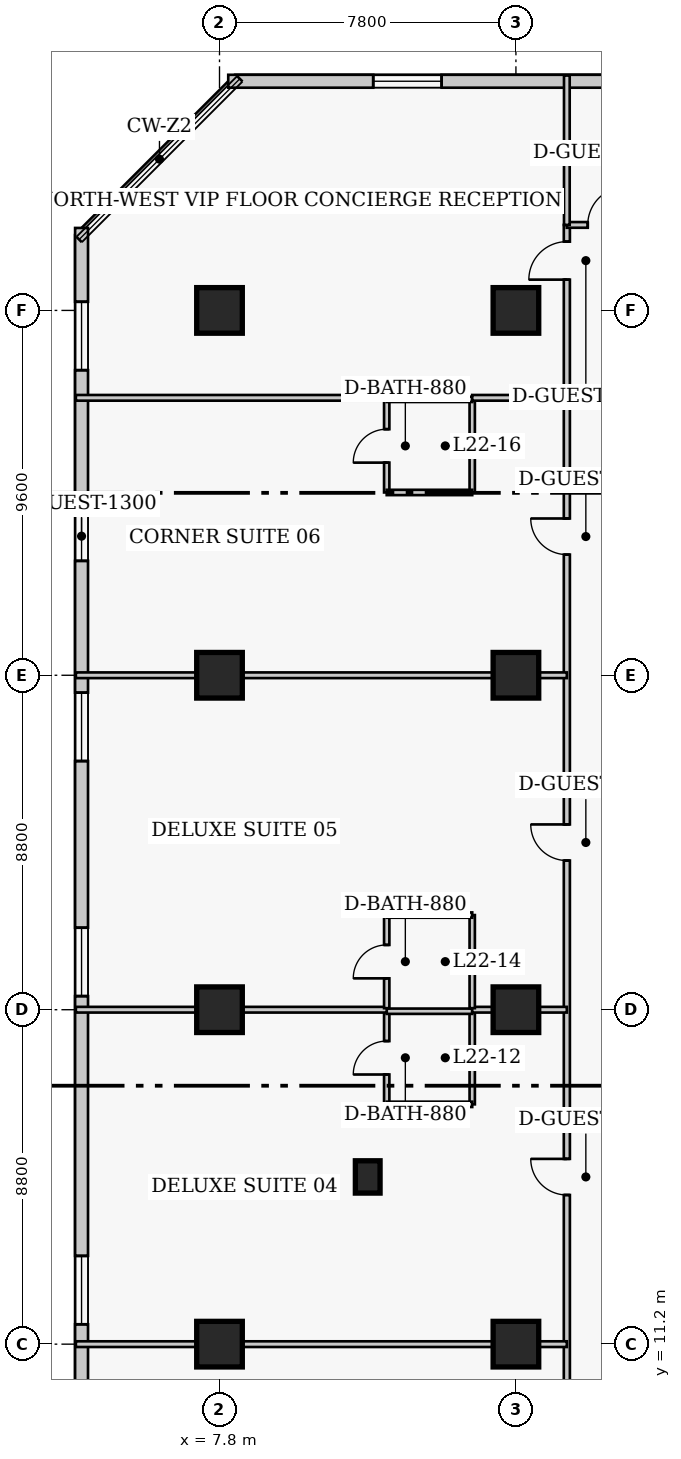
"""IFC4 building model, lengths in metres.
Left out: names, types, materials, properties, quantities, classifications, styles, units other than length and angle.
Written with IfcOpenShell. Run it as: python <this file> out.ifc"""

import sys

from ifc_helpers import new_model, si_unit, direction, frame, frame_2d, origin, origin_2d, place, context, subcontext, project, spatial, rectangle, extrude, element, fill, save


model = new_model("IFC4")
c1 = context("Model", 3, precision=1e-05, world=origin(), true_north=direction((0.0, 1.0)))
c2 = subcontext(c1, "Body", "Model", "MODEL_VIEW")
j1 = project(units=[si_unit("LENGTHUNIT", "METRE"), si_unit("PLANEANGLEUNIT", "RADIAN")], contexts=[c1])
p1 = place(None, origin())
s1 = spatial("IfcSite", under=j1, at=p1, CompositionType="ELEMENT")
p2 = place(p1, origin())
s2 = spatial("IfcBuilding", under=s1, at=p2, CompositionType="ELEMENT")
p3 = place(p2, frame((0.0, 0.0, 91.8)))
s3 = spatial("IfcBuildingStorey", under=s2, at=p3, CompositionType="ELEMENT", Elevation=91.8)
for number, where, z_axis, x_axis in (
    (1, (7.8, 11.2, 0.0), (0.0, 0.0, 1.0), (1.0, 0.0, 0.0)),
    (2, (7.8, 20.0, 0.0), (0.0, 0.0, 1.0), (1.0, 0.0, 0.0)),
    (3, (7.8, 28.8, 0.0), (0.0, 0.0, 1.0), (1.0, 0.0, 0.0)),
    (4, (7.8, 38.4, 0.0), (0.0, 0.0, 1.0), (1.0, 0.0, 0.0)),
    (5, (15.6, 11.2, 0.0), (0.0, 0.0, 1.0), (1.0, 0.0, 0.0)),
    (6, (15.6, 20.0, 0.0), (0.0, 0.0, 1.0), (1.0, 0.0, 0.0)),
    (7, (15.6, 28.8, 0.0), (0.0, 0.0, 1.0), (1.0, 0.0, 0.0)),
    (8, (15.6, 38.4, 0.0), (0.0, 0.0, 1.0), (1.0, 0.0, 0.0)),
):
    element("IfcColumn", number, at=place(p3, frame(where, z_axis=z_axis, x_axis=x_axis)), inside=s3, PredefinedType="COLUMN", context=c2, shape_type="SweptSolid", body=[
        extrude(rectangle(XDim=1.2, YDim=1.2, at=origin_2d()), origin(), (0.0, 0.0, 1.0), 3.8),
    ])
p4 = place(p3, frame((11.7, 15.6, 0.0), z_axis=(0.0, 0.0, 1.0), x_axis=(1.0, 0.0, 0.0)))
e9 = element("IfcColumn", 9, at=p4, inside=s3, PredefinedType="PILASTER", context=c2, shape_type="SweptSolid", body=[
    extrude(rectangle(XDim=0.65, YDim=0.85, at=origin_2d()), origin(), (0.0, 0.0, 1.0), 3.8),
])
p5 = place(p3, frame((36.32, 44.43, 0.0), z_axis=(0.0, 0.0, 1.0), x_axis=(-1.0, 0.0, 0.0)))
e10 = element("IfcWall", 10, at=p5, inside=s3, PredefinedType="SOLIDWALL", context=c2, shape_type="SweptSolid", body=[
    extrude(rectangle(XDim=28.29, YDim=0.34, at=frame_2d((14.145, 0.0))), origin(), (0.0, 0.0, 1.0), 3.54),
])
p6 = place(p5, frame((3.815, 0.0, 0.85)))
e11 = element("IfcOpeningElement", 11, at=p6, cuts=e10, PredefinedType="OPENING", context=c2, shape_type="SweptSolid", body=[
    extrude(rectangle(XDim=1.8, YDim=1.8, at=frame_2d((0.9, 0.9))), frame((0.0, 0.18, 0.0), z_axis=(0.0, -1.0, 0.0), x_axis=(1.0, 0.0, 0.0)), (0.0, 0.0, 1.0), 0.36),
])
p7 = place(p5, frame((13.245, 0.0, 0.85)))
e12 = element("IfcOpeningElement", 12, at=p7, cuts=e10, PredefinedType="OPENING", context=c2, shape_type="SweptSolid", body=[
    extrude(rectangle(XDim=1.8, YDim=1.8, at=frame_2d((0.9, 0.9))), frame((0.0, 0.18, 0.0), z_axis=(0.0, -1.0, 0.0), x_axis=(1.0, 0.0, 0.0)), (0.0, 0.0, 1.0), 0.36),
])
p8 = place(p5, frame((22.675, 0.0, 0.85)))
e13 = element("IfcOpeningElement", 13, at=p8, cuts=e10, PredefinedType="OPENING", context=c2, shape_type="SweptSolid", body=[
    extrude(rectangle(XDim=1.8, YDim=1.8, at=frame_2d((0.9, 0.9))), frame((0.0, 0.18, 0.0), z_axis=(0.0, -1.0, 0.0), x_axis=(1.0, 0.0, 0.0)), (0.0, 0.0, 1.0), 0.36),
])
p9 = place(p3, frame((4.17, 40.57, 0.0), z_axis=(0.0, 0.0, 1.0), x_axis=(0.0, -1.0, 0.0)))
e14 = element("IfcWall", 14, at=p9, inside=s3, PredefinedType="SOLIDWALL", context=c2, shape_type="SweptSolid", body=[
    extrude(rectangle(XDim=31.94, YDim=0.34, at=frame_2d((15.97, 0.0))), origin(), (0.0, 0.0, 1.0), 3.54),
])
p10 = place(p9, frame((1.942, 0.0, 0.85)))
e15 = element("IfcOpeningElement", 15, at=p10, cuts=e14, PredefinedType="OPENING", context=c2, shape_type="SweptSolid", body=[
    extrude(rectangle(XDim=1.8, YDim=1.8, at=frame_2d((0.9, 0.9))), frame((0.0, 0.18, 0.0), z_axis=(0.0, -1.0, 0.0), x_axis=(1.0, 0.0, 0.0)), (0.0, 0.0, 1.0), 0.36),
])
p11 = place(p9, frame((12.228, 0.0, 0.85)))
e16 = element("IfcOpeningElement", 16, at=p11, cuts=e14, PredefinedType="OPENING", context=c2, shape_type="SweptSolid", body=[
    extrude(rectangle(XDim=1.8, YDim=1.8, at=frame_2d((0.9, 0.9))), frame((0.0, 0.18, 0.0), z_axis=(0.0, -1.0, 0.0), x_axis=(1.0, 0.0, 0.0)), (0.0, 0.0, 1.0), 0.36),
])
p12 = place(p9, frame((18.413, 0.0, 0.85)))
e17 = element("IfcOpeningElement", 17, at=p12, cuts=e14, PredefinedType="OPENING", context=c2, shape_type="SweptSolid", body=[
    extrude(rectangle(XDim=1.8, YDim=1.8, at=frame_2d((0.9, 0.9))), frame((0.0, 0.18, 0.0), z_axis=(0.0, -1.0, 0.0), x_axis=(1.0, 0.0, 0.0)), (0.0, 0.0, 1.0), 0.36),
])
p13 = place(p9, frame((27.048, 0.0, 0.85)))
e18 = element("IfcOpeningElement", 18, at=p13, cuts=e14, PredefinedType="OPENING", context=c2, shape_type="SweptSolid", body=[
    extrude(rectangle(XDim=1.8, YDim=1.8, at=frame_2d((0.9, 0.9))), frame((0.0, 0.18, 0.0), z_axis=(0.0, -1.0, 0.0), x_axis=(1.0, 0.0, 0.0)), (0.0, 0.0, 1.0), 0.36),
])
p14 = place(p9, frame((7.46, 0.0, 0.85)))
e19 = element("IfcOpeningElement", 19, at=p14, cuts=e14, PredefinedType="OPENING", context=c2, shape_type="SweptSolid", body=[
    extrude(rectangle(XDim=1.3, YDim=1.7, at=frame_2d((0.65, 0.85))), frame((0.0, 0.18, 0.0), z_axis=(0.0, -1.0, 0.0), x_axis=(1.0, 0.0, 0.0)), (0.0, 0.0, 1.0), 0.36),
])
p15 = place(p3, frame((16.94, 6.65, 0.0), z_axis=(0.0, 0.0, 1.0), x_axis=(0.0, 1.0, 0.0)))
e20 = element("IfcWall", 20, at=p15, inside=s3, PredefinedType="PARTITIONING", context=c2, shape_type="SweptSolid", body=[
    extrude(rectangle(XDim=34.0, YDim=0.16, at=frame_2d((17.0, 0.0))), origin(), (0.0, 0.0, 1.0), 3.54),
])
p16 = place(p15, frame((1.8, 0.0, 0.0)))
e21 = element("IfcOpeningElement", 21, at=p16, cuts=e20, PredefinedType="OPENING", context=c2, shape_type="SweptSolid", body=[
    extrude(rectangle(XDim=0.95, YDim=2.1, at=frame_2d((0.475, 1.05))), frame((0.0, 0.09, 0.0), z_axis=(0.0, -1.0, 0.0), x_axis=(1.0, 0.0, 0.0)), (0.0, 0.0, 1.0), 0.18),
])
p17 = place(p15, frame((8.475, 0.0, 0.0)))
e22 = element("IfcOpeningElement", 22, at=p17, cuts=e20, PredefinedType="OPENING", context=c2, shape_type="SweptSolid", body=[
    extrude(rectangle(XDim=0.95, YDim=2.1, at=frame_2d((0.475, 1.05))), frame((0.0, 0.09, 0.0), z_axis=(0.0, -1.0, 0.0), x_axis=(1.0, 0.0, 0.0)), (0.0, 0.0, 1.0), 0.18),
])
p18 = place(p15, frame((17.275, 0.0, 0.0)))
e23 = element("IfcOpeningElement", 23, at=p18, cuts=e20, PredefinedType="OPENING", context=c2, shape_type="SweptSolid", body=[
    extrude(rectangle(XDim=0.95, YDim=2.1, at=frame_2d((0.475, 1.05))), frame((0.0, 0.09, 0.0), z_axis=(0.0, -1.0, 0.0), x_axis=(1.0, 0.0, 0.0)), (0.0, 0.0, 1.0), 0.18),
])
p19 = place(p15, frame((25.325, 0.0, 0.0)))
e24 = element("IfcOpeningElement", 24, at=p19, cuts=e20, PredefinedType="OPENING", context=c2, shape_type="SweptSolid", body=[
    extrude(rectangle(XDim=0.95, YDim=2.1, at=frame_2d((0.475, 1.05))), frame((0.0, 0.09, 0.0), z_axis=(0.0, -1.0, 0.0), x_axis=(1.0, 0.0, 0.0)), (0.0, 0.0, 1.0), 0.18),
])
p20 = place(p15, frame((32.56, 0.0, 0.0)))
e25 = element("IfcOpeningElement", 25, at=p20, cuts=e20, PredefinedType="OPENING", context=c2, shape_type="SweptSolid", body=[
    extrude(rectangle(XDim=1.0, YDim=2.15, at=frame_2d((0.5, 1.075))), frame((0.0, 0.09, 0.0), z_axis=(0.0, -1.0, 0.0), x_axis=(1.0, 0.0, 0.0)), (0.0, 0.0, 1.0), 0.18),
])
p21 = place(p3, frame((16.94, 40.65, 0.0), z_axis=(0.0, 0.0, 1.0), x_axis=(1.0, 0.0, 0.0)))
e26 = element("IfcWall", 26, at=p21, inside=s3, PredefinedType="PARTITIONING", context=c2, shape_type="SweptSolid", body=[
    extrude(rectangle(XDim=5.16, YDim=0.15, at=frame_2d((2.58, 0.0))), origin(), (0.0, 0.0, 1.0), 3.54),
])
p22 = place(p21, frame((0.55, 0.0, 0.0)))
e27 = element("IfcOpeningElement", 27, at=p22, cuts=e26, PredefinedType="OPENING", context=c2, shape_type="SweptSolid", body=[
    extrude(rectangle(XDim=1.0, YDim=2.15, at=frame_2d((0.5, 1.075))), frame((0.0, 0.085, 0.0), z_axis=(0.0, -1.0, 0.0), x_axis=(1.0, 0.0, 0.0)), (0.0, 0.0, 1.0), 0.17),
])
p23 = place(p3, frame((16.94, 40.65, 0.0), z_axis=(0.0, 0.0, 1.0), x_axis=(0.0, 1.0, 0.0)))
e28 = element("IfcWall", 28, at=p23, inside=s3, PredefinedType="PARTITIONING", context=c2, shape_type="SweptSolid", body=[
    extrude(rectangle(XDim=3.93, YDim=0.15, at=frame_2d((1.965, 0.0))), origin(), (0.0, 0.0, 1.0), 3.54),
])
p24 = place(p3, frame((4.02, 11.2, 0.0), z_axis=(0.0, 0.0, 1.0), x_axis=(1.0, 0.0, 0.0)))
e29 = element("IfcWall", 29, at=p24, inside=s3, PredefinedType="PARTITIONING", context=c2, shape_type="SweptSolid", body=[
    extrude(rectangle(XDim=12.92, YDim=0.15, at=frame_2d((6.46, 0.0))), origin(), (0.0, 0.0, 1.0), 2.679),
])
p25 = place(p3, frame((12.2, 17.51, 0.0), z_axis=(0.0, 0.0, 1.0), x_axis=(0.0, 1.0, 0.0)))
e30 = element("IfcWall", 30, at=p25, inside=s3, PredefinedType="PLUMBINGWALL", context=c2, shape_type="SweptSolid", body=[
    extrude(rectangle(XDim=2.45, YDim=0.14, at=frame_2d((1.225, 0.0))), origin(), (0.0, 0.0, 1.0), 3.54),
])
p26 = place(p25, frame((0.785, 0.0, 0.0)))
e31 = element("IfcOpeningElement", 31, at=p26, cuts=e30, PredefinedType="OPENING", context=c2, shape_type="SweptSolid", body=[
    extrude(rectangle(XDim=0.88, YDim=2.05, at=frame_2d((0.44, 1.025))), frame((0.0, 0.08, 0.0), z_axis=(0.0, -1.0, 0.0), x_axis=(1.0, 0.0, 0.0)), (0.0, 0.0, 1.0), 0.16),
])
p27 = place(p3, frame((14.45, 17.51, 0.0), z_axis=(0.0, 0.0, 1.0), x_axis=(0.0, 1.0, 0.0)))
e32 = element("IfcWall", 32, at=p27, inside=s3, PredefinedType="PLUMBINGWALL", context=c2, shape_type="SweptSolid", body=[
    extrude(rectangle(XDim=2.45, YDim=0.14, at=frame_2d((1.225, 0.0))), origin(), (0.0, 0.0, 1.0), 3.54),
])
p28 = place(p3, frame((12.2, 17.51, 0.0), z_axis=(0.0, 0.0, 1.0), x_axis=(1.0, 0.0, 0.0)))
e33 = element("IfcWall", 33, at=p28, inside=s3, PredefinedType="PLUMBINGWALL", context=c2, shape_type="SweptSolid", body=[
    extrude(rectangle(XDim=2.25, YDim=0.14, at=frame_2d((1.125, 0.0))), origin(), (0.0, 0.0, 1.0), 3.54),
])
p29 = place(p3, frame((12.2, 19.96, 0.0), z_axis=(0.0, 0.0, 1.0), x_axis=(1.0, 0.0, 0.0)))
e34 = element("IfcWall", 34, at=p29, inside=s3, PredefinedType="PLUMBINGWALL", context=c2, shape_type="SweptSolid", body=[
    extrude(rectangle(XDim=2.25, YDim=0.14, at=frame_2d((1.125, 0.0))), origin(), (0.0, 0.0, 1.0), 2.679),
])
p30 = place(p3, frame((4.02, 20.0, 0.0), z_axis=(0.0, 0.0, 1.0), x_axis=(1.0, 0.0, 0.0)))
e35 = element("IfcWall", 35, at=p30, inside=s3, PredefinedType="PARTITIONING", context=c2, shape_type="SweptSolid", body=[
    extrude(rectangle(XDim=8.18, YDim=0.15, at=frame_2d((4.09, 0.0))), origin(), (0.0, 0.0, 1.0), 2.679),
])
p31 = place(p3, frame((14.45, 20.0, 0.0), z_axis=(0.0, 0.0, 1.0), x_axis=(1.0, 0.0, 0.0)))
e36 = element("IfcWall", 36, at=p31, inside=s3, PredefinedType="PARTITIONING", context=c2, shape_type="SweptSolid", body=[
    extrude(rectangle(XDim=2.49, YDim=0.15, at=frame_2d((1.245, 0.0))), origin(), (0.0, 0.0, 1.0), 2.679),
])
p32 = place(p3, frame((12.2, 20.04, 0.0), z_axis=(0.0, 0.0, 1.0), x_axis=(0.0, 1.0, 0.0)))
e37 = element("IfcWall", 37, at=p32, inside=s3, PredefinedType="PLUMBINGWALL", context=c2, shape_type="SweptSolid", body=[
    extrude(rectangle(XDim=2.45, YDim=0.14, at=frame_2d((1.225, 0.0))), origin(), (0.0, 0.0, 1.0), 3.54),
])
p33 = place(p32, frame((0.785, 0.0, 0.0)))
e38 = element("IfcOpeningElement", 38, at=p33, cuts=e37, PredefinedType="OPENING", context=c2, shape_type="SweptSolid", body=[
    extrude(rectangle(XDim=0.88, YDim=2.05, at=frame_2d((0.44, 1.025))), frame((0.0, 0.08, 0.0), z_axis=(0.0, -1.0, 0.0), x_axis=(1.0, 0.0, 0.0)), (0.0, 0.0, 1.0), 0.16),
])
p34 = place(p3, frame((14.45, 20.04, 0.0), z_axis=(0.0, 0.0, 1.0), x_axis=(0.0, 1.0, 0.0)))
e39 = element("IfcWall", 39, at=p34, inside=s3, PredefinedType="PLUMBINGWALL", context=c2, shape_type="SweptSolid", body=[
    extrude(rectangle(XDim=2.45, YDim=0.14, at=frame_2d((1.225, 0.0))), origin(), (0.0, 0.0, 1.0), 3.54),
])
p35 = place(p3, frame((12.2, 22.49, 0.0), z_axis=(0.0, 0.0, 1.0), x_axis=(1.0, 0.0, 0.0)))
e40 = element("IfcWall", 40, at=p35, inside=s3, PredefinedType="PLUMBINGWALL", context=c2, shape_type="SweptSolid", body=[
    extrude(rectangle(XDim=2.25, YDim=0.14, at=frame_2d((1.125, 0.0))), origin(), (0.0, 0.0, 1.0), 3.54),
])
p36 = place(p3, frame((4.02, 28.8, 0.0), z_axis=(0.0, 0.0, 1.0), x_axis=(1.0, 0.0, 0.0)))
e41 = element("IfcWall", 41, at=p36, inside=s3, PredefinedType="PARTITIONING", context=c2, shape_type="SweptSolid", body=[
    extrude(rectangle(XDim=12.92, YDim=0.15, at=frame_2d((6.46, 0.0))), origin(), (0.0, 0.0, 1.0), 2.679),
])
p37 = place(p3, frame((12.2, 33.61, 0.0), z_axis=(0.0, 0.0, 1.0), x_axis=(0.0, 1.0, 0.0)))
e42 = element("IfcWall", 42, at=p37, inside=s3, PredefinedType="PLUMBINGWALL", context=c2, shape_type="SweptSolid", body=[
    extrude(rectangle(XDim=2.45, YDim=0.14, at=frame_2d((1.225, 0.0))), origin(), (0.0, 0.0, 1.0), 3.54),
])
p38 = place(p37, frame((0.785, 0.0, 0.0)))
e43 = element("IfcOpeningElement", 43, at=p38, cuts=e42, PredefinedType="OPENING", context=c2, shape_type="SweptSolid", body=[
    extrude(rectangle(XDim=0.88, YDim=2.05, at=frame_2d((0.44, 1.025))), frame((0.0, 0.08, 0.0), z_axis=(0.0, -1.0, 0.0), x_axis=(1.0, 0.0, 0.0)), (0.0, 0.0, 1.0), 0.16),
])
p39 = place(p3, frame((14.45, 33.61, 0.0), z_axis=(0.0, 0.0, 1.0), x_axis=(0.0, 1.0, 0.0)))
e44 = element("IfcWall", 44, at=p39, inside=s3, PredefinedType="PLUMBINGWALL", context=c2, shape_type="SweptSolid", body=[
    extrude(rectangle(XDim=2.45, YDim=0.14, at=frame_2d((1.225, 0.0))), origin(), (0.0, 0.0, 1.0), 3.54),
])
for number, where, z_axis, x_axis in (
    (45, (12.2, 33.61, 0.0), (0.0, 0.0, 1.0), (1.0, 0.0, 0.0)),
    (46, (12.2, 36.06, 0.0), (0.0, 0.0, 1.0), (1.0, 0.0, 0.0)),
):
    element("IfcWall", number, at=place(p3, frame(where, z_axis=z_axis, x_axis=x_axis)), inside=s3, PredefinedType="PLUMBINGWALL", context=c2, shape_type="SweptSolid", body=[
        extrude(rectangle(XDim=2.25, YDim=0.14, at=frame_2d((1.125, 0.0))), origin(), (0.0, 0.0, 1.0), 3.54),
    ])
p40 = place(p3, frame((4.02, 36.1, 0.0), z_axis=(0.0, 0.0, 1.0), x_axis=(1.0, 0.0, 0.0)))
e47 = element("IfcWall", 47, at=p40, inside=s3, PredefinedType="PARTITIONING", context=c2, shape_type="SweptSolid", body=[
    extrude(rectangle(XDim=8.18, YDim=0.15, at=frame_2d((4.09, 0.0))), origin(), (0.0, 0.0, 1.0), 3.54),
])
p41 = place(p3, frame((14.45, 36.1, 0.0), z_axis=(0.0, 0.0, 1.0), x_axis=(1.0, 0.0, 0.0)))
e48 = element("IfcWall", 48, at=p41, inside=s3, PredefinedType="PARTITIONING", context=c2, shape_type="SweptSolid", body=[
    extrude(rectangle(XDim=2.49, YDim=0.15, at=frame_2d((1.245, 0.0))), origin(), (0.0, 0.0, 1.0), 3.54),
])
p42 = place(p8, origin())
e49 = element("IfcWindow", 49, at=p42, inside=s3, PartitioningType="SINGLE_PANEL", PredefinedType="WINDOW", context=c2, shape_type="SweptSolid", body=[
    extrude(rectangle(XDim=1.8, YDim=1.8, at=frame_2d((0.9, 0.9))), frame((0.0, 0.03, 0.0), z_axis=(0.0, -1.0, 0.0), x_axis=(1.0, 0.0, 0.0)), (0.0, 0.0, 1.0), 0.06),
])
fill(e13, e49)
p43 = place(p10, origin())
e50 = element("IfcWindow", 50, at=p43, inside=s3, PartitioningType="SINGLE_PANEL", PredefinedType="WINDOW", context=c2, shape_type="SweptSolid", body=[
    extrude(rectangle(XDim=1.8, YDim=1.8, at=frame_2d((0.9, 0.9))), frame((0.0, 0.03, 0.0), z_axis=(0.0, -1.0, 0.0), x_axis=(1.0, 0.0, 0.0)), (0.0, 0.0, 1.0), 0.06),
])
fill(e15, e50)
p44 = place(p11, origin())
e51 = element("IfcWindow", 51, at=p44, inside=s3, PartitioningType="SINGLE_PANEL", PredefinedType="WINDOW", context=c2, shape_type="SweptSolid", body=[
    extrude(rectangle(XDim=1.8, YDim=1.8, at=frame_2d((0.9, 0.9))), frame((0.0, 0.03, 0.0), z_axis=(0.0, -1.0, 0.0), x_axis=(1.0, 0.0, 0.0)), (0.0, 0.0, 1.0), 0.06),
])
fill(e16, e51)
p45 = place(p12, origin())
e52 = element("IfcWindow", 52, at=p45, inside=s3, PartitioningType="SINGLE_PANEL", PredefinedType="WINDOW", context=c2, shape_type="SweptSolid", body=[
    extrude(rectangle(XDim=1.8, YDim=1.8, at=frame_2d((0.9, 0.9))), frame((0.0, 0.03, 0.0), z_axis=(0.0, -1.0, 0.0), x_axis=(1.0, 0.0, 0.0)), (0.0, 0.0, 1.0), 0.06),
])
fill(e17, e52)
p46 = place(p13, origin())
e53 = element("IfcWindow", 53, at=p46, inside=s3, PartitioningType="SINGLE_PANEL", PredefinedType="WINDOW", context=c2, shape_type="SweptSolid", body=[
    extrude(rectangle(XDim=1.8, YDim=1.8, at=frame_2d((0.9, 0.9))), frame((0.0, 0.03, 0.0), z_axis=(0.0, -1.0, 0.0), x_axis=(1.0, 0.0, 0.0)), (0.0, 0.0, 1.0), 0.06),
])
fill(e18, e53)
p47 = place(p14, origin())
e54 = element("IfcWindow", 54, at=p47, inside=s3, PartitioningType="SINGLE_PANEL", PredefinedType="WINDOW", context=c2, shape_type="SweptSolid", body=[
    extrude(rectangle(XDim=1.3, YDim=1.7, at=frame_2d((0.65, 0.85))), frame((0.0, 0.03, 0.0), z_axis=(0.0, -1.0, 0.0), x_axis=(1.0, 0.0, 0.0)), (0.0, 0.0, 1.0), 0.06),
])
fill(e19, e54)
p48 = place(p22, origin())
e55 = element("IfcDoor", 55, at=p48, inside=s3, OperationType="SINGLE_SWING_RIGHT", PredefinedType="DOOR", context=c2, shape_type="SweptSolid", body=[
    extrude(rectangle(XDim=1.0, YDim=2.15, at=frame_2d((0.5, 1.075))), frame((0.0, 0.025, 0.0), z_axis=(0.0, -1.0, 0.0), x_axis=(1.0, 0.0, 0.0)), (0.0, 0.0, 1.0), 0.05),
])
fill(e27, e55)
p49 = place(p26, origin())
e56 = element("IfcDoor", 56, at=p49, inside=s3, OperationType="SINGLE_SWING_LEFT", PredefinedType="DOOR", context=c2, shape_type="SweptSolid", body=[
    extrude(rectangle(XDim=0.88, YDim=2.05, at=frame_2d((0.44, 1.025))), frame((0.0, 0.025, 0.0), z_axis=(0.0, -1.0, 0.0), x_axis=(1.0, 0.0, 0.0)), (0.0, 0.0, 1.0), 0.05),
])
fill(e31, e56)
p50 = place(p17, origin())
e57 = element("IfcDoor", 57, at=p50, inside=s3, OperationType="SINGLE_SWING_RIGHT", PredefinedType="DOOR", context=c2, shape_type="SweptSolid", body=[
    extrude(rectangle(XDim=0.95, YDim=2.1, at=frame_2d((0.475, 1.05))), frame((0.0, 0.025, 0.0), z_axis=(0.0, -1.0, 0.0), x_axis=(1.0, 0.0, 0.0)), (0.0, 0.0, 1.0), 0.05),
])
fill(e22, e57)
p51 = place(p33, origin())
e58 = element("IfcDoor", 58, at=p51, inside=s3, OperationType="SINGLE_SWING_LEFT", PredefinedType="DOOR", context=c2, shape_type="SweptSolid", body=[
    extrude(rectangle(XDim=0.88, YDim=2.05, at=frame_2d((0.44, 1.025))), frame((0.0, 0.025, 0.0), z_axis=(0.0, -1.0, 0.0), x_axis=(1.0, 0.0, 0.0)), (0.0, 0.0, 1.0), 0.05),
])
fill(e38, e58)
p52 = place(p18, origin())
e59 = element("IfcDoor", 59, at=p52, inside=s3, OperationType="SINGLE_SWING_RIGHT", PredefinedType="DOOR", context=c2, shape_type="SweptSolid", body=[
    extrude(rectangle(XDim=0.95, YDim=2.1, at=frame_2d((0.475, 1.05))), frame((0.0, 0.025, 0.0), z_axis=(0.0, -1.0, 0.0), x_axis=(1.0, 0.0, 0.0)), (0.0, 0.0, 1.0), 0.05),
])
fill(e23, e59)
p53 = place(p38, origin())
e60 = element("IfcDoor", 60, at=p53, inside=s3, OperationType="SINGLE_SWING_LEFT", PredefinedType="DOOR", context=c2, shape_type="SweptSolid", body=[
    extrude(rectangle(XDim=0.88, YDim=2.05, at=frame_2d((0.44, 1.025))), frame((0.0, 0.025, 0.0), z_axis=(0.0, -1.0, 0.0), x_axis=(1.0, 0.0, 0.0)), (0.0, 0.0, 1.0), 0.05),
])
fill(e43, e60)
p54 = place(p19, origin())
e61 = element("IfcDoor", 61, at=p54, inside=s3, OperationType="SINGLE_SWING_RIGHT", PredefinedType="DOOR", context=c2, shape_type="SweptSolid", body=[
    extrude(rectangle(XDim=0.95, YDim=2.1, at=frame_2d((0.475, 1.05))), frame((0.0, 0.025, 0.0), z_axis=(0.0, -1.0, 0.0), x_axis=(1.0, 0.0, 0.0)), (0.0, 0.0, 1.0), 0.05),
])
fill(e24, e61)
p55 = place(p20, origin())
e62 = element("IfcDoor", 62, at=p55, inside=s3, OperationType="SINGLE_SWING_LEFT", PredefinedType="DOOR", context=c2, shape_type="SweptSolid", body=[
    extrude(rectangle(XDim=1.0, YDim=2.15, at=frame_2d((0.5, 1.075))), frame((0.0, 0.025, 0.0), z_axis=(0.0, -1.0, 0.0), x_axis=(1.0, 0.0, 0.0)), (0.0, 0.0, 1.0), 0.05),
])
fill(e25, e62)
save(model, sys.argv[1])
